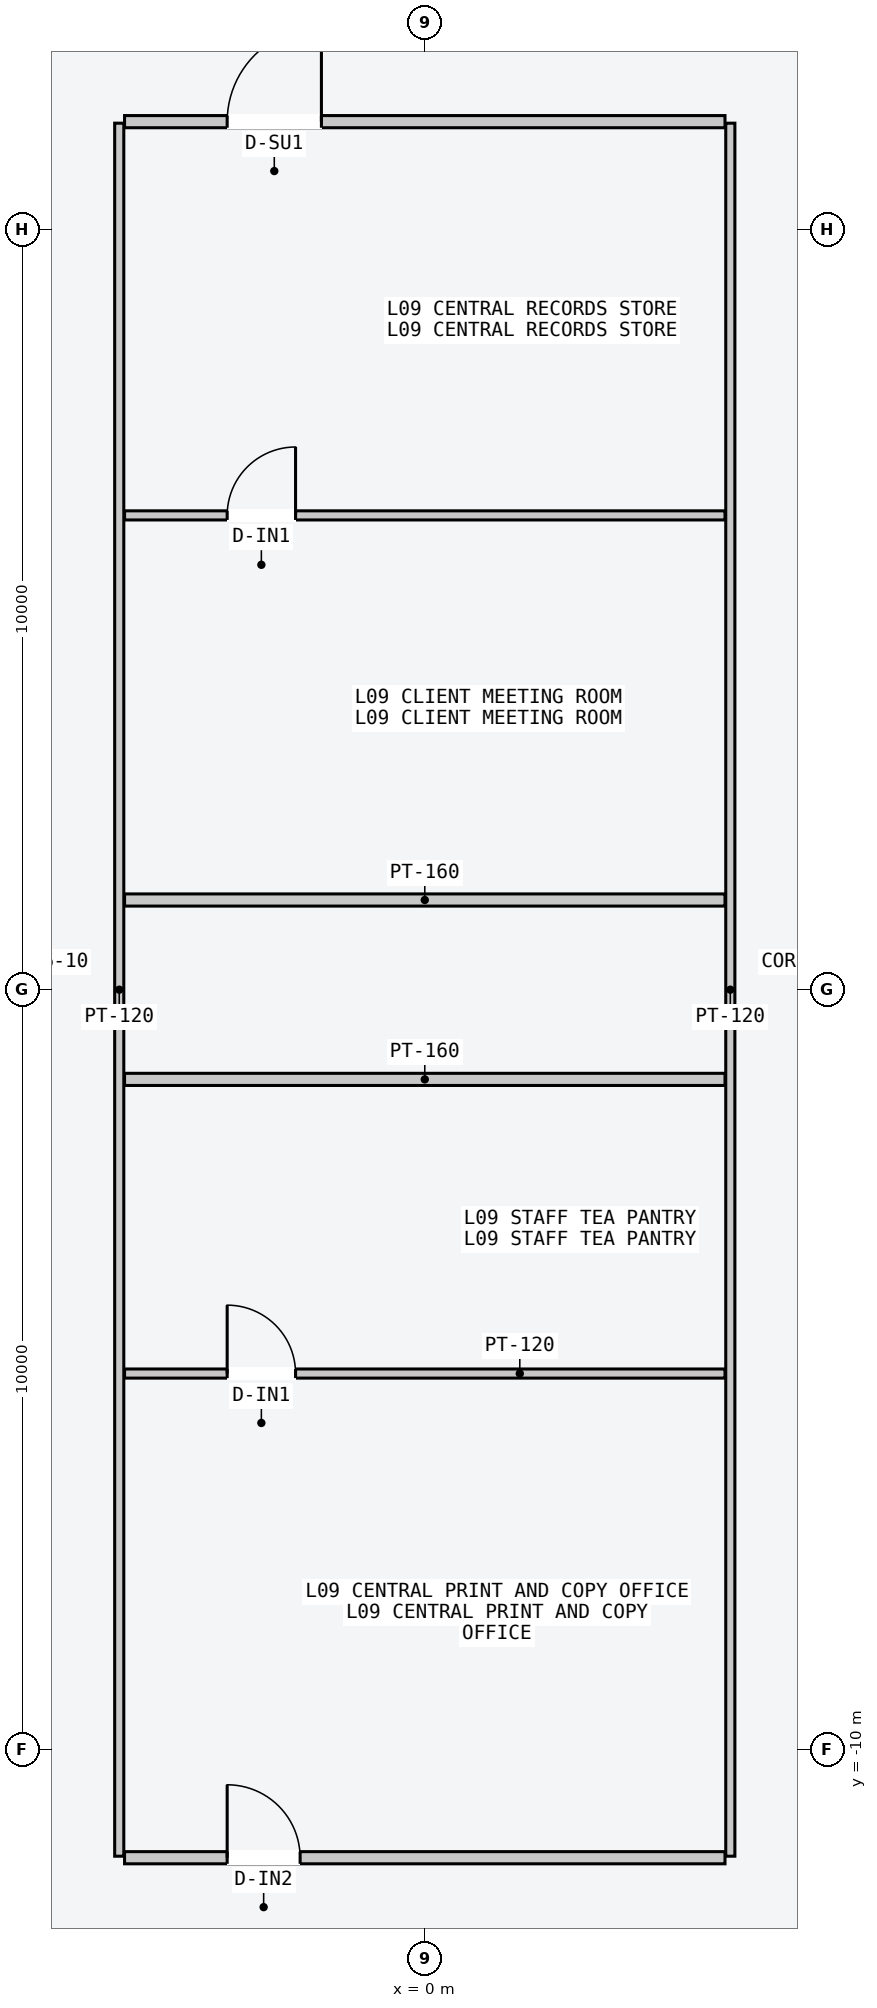
"""IFC4 building model, lengths in metres.
Left out: names, types, materials, properties, quantities, classifications, styles, units other than length and angle.
Written with IfcOpenShell. Run it as: python <this file> out.ifc"""

import sys

from ifc_helpers import new_model, si_unit, direction, frame, frame_2d, origin, place, context, subcontext, project, spatial, rectangle, extrude, element, fill, save


model = new_model("IFC4")
c1 = context("Model", 3, precision=1e-05, world=origin(), true_north=direction((0.0, 1.0)))
c2 = subcontext(c1, "Body", "Model", "MODEL_VIEW")
j1 = project(units=[si_unit("LENGTHUNIT", "METRE"), si_unit("PLANEANGLEUNIT", "RADIAN")], contexts=[c1])
p1 = place(None, origin())
s1 = spatial("IfcSite", under=j1, at=p1, CompositionType="ELEMENT")
p2 = place(p1, origin())
s2 = spatial("IfcBuilding", under=s1, at=p2, CompositionType="ELEMENT")
p3 = place(p2, frame((0.0, 0.0, 38.4)))
s3 = spatial("IfcBuildingStorey", under=s2, at=p3, CompositionType="ELEMENT", Elevation=38.4)
for number, where, z_axis, x_axis in (
    (1, (-4.02, -11.4, 0.0), (0.0, 0.0, 1.0), (0.0, 1.0, 0.0)),
    (2, (4.02, -11.4, 0.0), (0.0, 0.0, 1.0), (0.0, 1.0, 0.0)),
):
    element("IfcWall", number, at=place(p3, frame(where, z_axis=z_axis, x_axis=x_axis)), inside=s3, PredefinedType="PARTITIONING", context=c2, shape_type="SweptSolid", body=[
        extrude(rectangle(XDim=22.8, YDim=0.12, at=frame_2d((11.4, 0.0))), origin(), (0.0, 0.0, 1.0), 3.4),
    ])
p4 = place(p3, frame((-3.95, 1.18, 0.0), z_axis=(0.0, 0.0, 1.0), x_axis=(1.0, 0.0, 0.0)))
e3 = element("IfcWall", 3, at=p4, inside=s3, PredefinedType="PARTITIONING", context=c2, shape_type="SweptSolid", body=[
    extrude(rectangle(XDim=7.9, YDim=0.16, at=frame_2d((3.95, 0.0))), origin(), (0.0, 0.0, 1.0), 3.4),
])
p5 = place(p3, frame((-3.95, 11.42, 0.0), z_axis=(0.0, 0.0, 1.0), x_axis=(1.0, 0.0, 0.0)))
e4 = element("IfcWall", 4, at=p5, inside=s3, PredefinedType="PARTITIONING", context=c2, shape_type="SweptSolid", body=[
    extrude(rectangle(XDim=7.9, YDim=0.16, at=frame_2d((3.95, 0.0))), origin(), (0.0, 0.0, 1.0), 3.4),
])
p6 = place(p5, frame((1.35, 0.0, 0.0)))
e5 = element("IfcOpeningElement", 5, at=p6, cuts=e4, PredefinedType="OPENING", context=c2, shape_type="SweptSolid", body=[
    extrude(rectangle(XDim=1.24, YDim=2.24, at=frame_2d((0.62, 1.12))), frame((0.0, 0.09, 0.0), z_axis=(0.0, -1.0, 0.0), x_axis=(1.0, 0.0, 0.0)), (0.0, 0.0, 1.0), 0.18),
])
p7 = place(p3, frame((-3.95, -1.18, 0.0), z_axis=(0.0, 0.0, 1.0), x_axis=(1.0, 0.0, 0.0)))
e6 = element("IfcWall", 6, at=p7, inside=s3, PredefinedType="PARTITIONING", context=c2, shape_type="SweptSolid", body=[
    extrude(rectangle(XDim=7.9, YDim=0.16, at=frame_2d((3.95, 0.0))), origin(), (0.0, 0.0, 1.0), 3.4),
])
p8 = place(p3, frame((-3.95, -11.42, 0.0), z_axis=(0.0, 0.0, 1.0), x_axis=(1.0, 0.0, 0.0)))
e7 = element("IfcWall", 7, at=p8, inside=s3, PredefinedType="PARTITIONING", context=c2, shape_type="SweptSolid", body=[
    extrude(rectangle(XDim=7.9, YDim=0.16, at=frame_2d((3.95, 0.0))), origin(), (0.0, 0.0, 1.0), 3.4),
])
p9 = place(p8, frame((1.35, 0.0, 0.0)))
e8 = element("IfcOpeningElement", 8, at=p9, cuts=e7, PredefinedType="OPENING", context=c2, shape_type="SweptSolid", body=[
    extrude(rectangle(XDim=0.96, YDim=2.18, at=frame_2d((0.48, 1.09))), frame((0.0, 0.09, 0.0), z_axis=(0.0, -1.0, 0.0), x_axis=(1.0, 0.0, 0.0)), (0.0, 0.0, 1.0), 0.18),
])
p10 = place(p3, frame((-3.95, 6.24, 0.0), z_axis=(0.0, 0.0, 1.0), x_axis=(1.0, 0.0, 0.0)))
e9 = element("IfcWall", 9, at=p10, inside=s3, PredefinedType="PARTITIONING", context=c2, shape_type="SweptSolid", body=[
    extrude(rectangle(XDim=7.9, YDim=0.12, at=frame_2d((3.95, 0.0))), origin(), (0.0, 0.0, 1.0), 3.4),
])
p11 = place(p10, frame((1.35, 0.0, 0.0)))
e10 = element("IfcOpeningElement", 10, at=p11, cuts=e9, PredefinedType="OPENING", context=c2, shape_type="SweptSolid", body=[
    extrude(rectangle(XDim=0.9, YDim=2.15, at=frame_2d((0.45, 1.075))), frame((0.0, 0.07, 0.0), z_axis=(0.0, -1.0, 0.0), x_axis=(1.0, 0.0, 0.0)), (0.0, 0.0, 1.0), 0.14),
])
p12 = place(p3, frame((-3.95, -5.05, 0.0), z_axis=(0.0, 0.0, 1.0), x_axis=(1.0, 0.0, 0.0)))
e11 = element("IfcWall", 11, at=p12, inside=s3, PredefinedType="PARTITIONING", context=c2, shape_type="SweptSolid", body=[
    extrude(rectangle(XDim=7.9, YDim=0.12, at=frame_2d((3.95, 0.0))), origin(), (0.0, 0.0, 1.0), 3.4),
])
p13 = place(p12, frame((1.35, 0.0, 0.0)))
e12 = element("IfcOpeningElement", 12, at=p13, cuts=e11, PredefinedType="OPENING", context=c2, shape_type="SweptSolid", body=[
    extrude(rectangle(XDim=0.9, YDim=2.15, at=frame_2d((0.45, 1.075))), frame((0.0, 0.07, 0.0), z_axis=(0.0, -1.0, 0.0), x_axis=(1.0, 0.0, 0.0)), (0.0, 0.0, 1.0), 0.14),
])
p14 = place(p6, origin())
e13 = element("IfcDoor", 13, at=p14, inside=s3, OperationType="SINGLE_SWING_RIGHT", PredefinedType="DOOR", context=c2, shape_type="SweptSolid", body=[
    extrude(rectangle(XDim=1.24, YDim=2.24, at=frame_2d((0.62, 1.12))), frame((0.0, 0.025, 0.0), z_axis=(0.0, -1.0, 0.0), x_axis=(1.0, 0.0, 0.0)), (0.0, 0.0, 1.0), 0.05),
])
fill(e5, e13)
p15 = place(p9, origin())
e14 = element("IfcDoor", 14, at=p15, inside=s3, OperationType="SINGLE_SWING_LEFT", PredefinedType="DOOR", context=c2, shape_type="SweptSolid", body=[
    extrude(rectangle(XDim=0.96, YDim=2.18, at=frame_2d((0.48, 1.09))), frame((0.0, 0.025, 0.0), z_axis=(0.0, -1.0, 0.0), x_axis=(1.0, 0.0, 0.0)), (0.0, 0.0, 1.0), 0.05),
])
fill(e8, e14)
p16 = place(p11, origin())
e15 = element("IfcDoor", 15, at=p16, inside=s3, OperationType="SINGLE_SWING_RIGHT", PredefinedType="DOOR", context=c2, shape_type="SweptSolid", body=[
    extrude(rectangle(XDim=0.9, YDim=2.15, at=frame_2d((0.45, 1.075))), frame((0.0, 0.025, 0.0), z_axis=(0.0, -1.0, 0.0), x_axis=(1.0, 0.0, 0.0)), (0.0, 0.0, 1.0), 0.05),
])
fill(e10, e15)
p17 = place(p13, origin())
e16 = element("IfcDoor", 16, at=p17, inside=s3, OperationType="SINGLE_SWING_LEFT", PredefinedType="DOOR", context=c2, shape_type="SweptSolid", body=[
    extrude(rectangle(XDim=0.9, YDim=2.15, at=frame_2d((0.45, 1.075))), frame((0.0, 0.025, 0.0), z_axis=(0.0, -1.0, 0.0), x_axis=(1.0, 0.0, 0.0)), (0.0, 0.0, 1.0), 0.05),
])
fill(e12, e16)
save(model, sys.argv[1])
